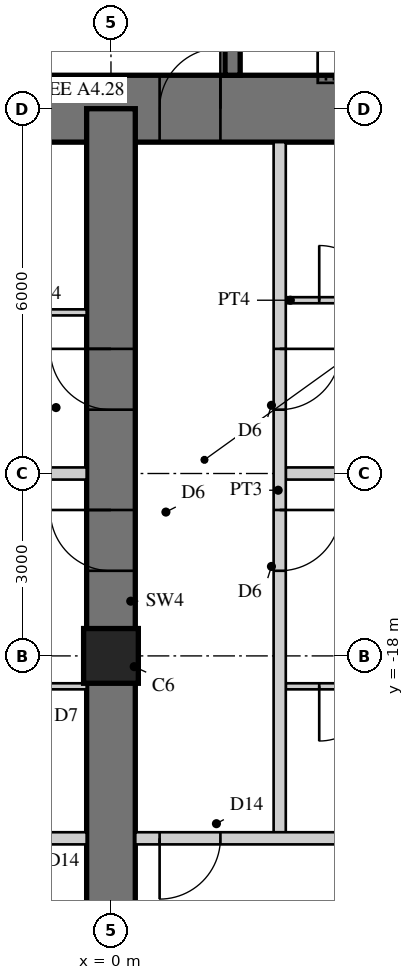
"""IFC4 building model, lengths in metres.
Left out: names, types, materials, properties, quantities, classifications, styles, units other than length and angle.
Written with IfcOpenShell. Run it as: python <this file> out.ifc"""

import sys

from ifc_helpers import new_model, si_unit, direction, frame, frame_2d, origin, origin_2d, place, context, subcontext, project, spatial, rectangle, extrude, element, fill, save


model = new_model("IFC4")
c1 = context("Model", 3, precision=1e-05, world=origin(), true_north=direction((0.0, 1.0)))
c2 = subcontext(c1, "Body", "Model", "MODEL_VIEW")
j1 = project(units=[si_unit("LENGTHUNIT", "METRE"), si_unit("PLANEANGLEUNIT", "RADIAN")], contexts=[c1])
p1 = place(None, origin())
s1 = spatial("IfcSite", under=j1, at=p1, CompositionType="ELEMENT")
p2 = place(p1, origin())
s2 = spatial("IfcBuilding", under=s1, at=p2, CompositionType="ELEMENT")
p3 = place(p2, frame((0.0, 0.0, 172.9)))
s3 = spatial("IfcBuildingStorey", under=s2, at=p3, CompositionType="ELEMENT", Elevation=172.9)
p4 = place(p3, frame((-9.0, -9.0, 0.0), z_axis=(0.0, 0.0, 1.0), x_axis=(1.0, 0.0, 0.0)))
e1 = element("IfcWall", 1, at=p4, inside=s3, PredefinedType="SHEAR", context=c2, shape_type="SweptSolid", body=[
    extrude(rectangle(XDim=18.0, YDim=1.1, at=frame_2d((9.0, 0.0))), origin(), (0.0, 0.0, 1.0), 3.4),
])
p5 = place(p4, frame((9.8, 0.0, 0.0)))
e2 = element("IfcOpeningElement", 2, at=p5, cuts=e1, PredefinedType="OPENING", context=c2, shape_type="SweptSolid", body=[
    extrude(rectangle(XDim=1.0, YDim=2.4, at=frame_2d((0.5, 1.2))), frame((0.0, 0.56, 0.0), z_axis=(0.0, -1.0, 0.0), x_axis=(1.0, 0.0, 0.0)), (0.0, 0.0, 1.0), 1.12),
])
p6 = place(p3, frame((2.0, -1.675, 0.0), z_axis=(0.0, 0.0, 1.0), x_axis=(0.0, -1.0, 0.0)))
e3 = element("IfcWall", 3, at=p6, inside=s3, PredefinedType="SHEAR", context=c2, shape_type="SweptSolid", body=[
    extrude(rectangle(XDim=6.775, YDim=0.25, at=frame_2d((3.387, 0.0))), origin(), (0.0, 0.0, 1.0), 3.4),
])
p7 = place(p6, frame((0.725, 0.0, 0.0)))
e4 = element("IfcOpeningElement", 4, at=p7, cuts=e3, PredefinedType="OPENING", context=c2, shape_type="SweptSolid", body=[
    extrude(rectangle(XDim=1.0, YDim=2.1, at=frame_2d((0.5, 1.05))), frame((0.0, 0.135, 0.0), z_axis=(0.0, -1.0, 0.0), x_axis=(1.0, 0.0, 0.0)), (0.0, 0.0, 1.0), 0.27),
])
p8 = place(p3, frame((0.0, -9.0, 0.0), z_axis=(0.0, 0.0, 1.0), x_axis=(0.0, -1.0, 0.0)))
e5 = element("IfcWall", 5, at=p8, inside=s3, PredefinedType="SHEAR", context=c2, shape_type="SweptSolid", body=[
    extrude(rectangle(XDim=18.0, YDim=0.8, at=frame_2d((9.0, 0.0))), origin(), (0.0, 0.0, 1.0), 3.4),
])
p9 = place(p8, frame((3.95, 0.0, 0.0)))
e6 = element("IfcOpeningElement", 6, at=p9, cuts=e5, PredefinedType="OPENING", context=c2, shape_type="SweptSolid", body=[
    extrude(rectangle(XDim=1.0, YDim=2.15, at=frame_2d((0.5, 1.075))), frame((0.0, 0.41, 0.0), z_axis=(0.0, -1.0, 0.0), x_axis=(1.0, 0.0, 0.0)), (0.0, 0.0, 1.0), 0.82),
])
p10 = place(p8, frame((6.6, 0.0, 0.0)))
e7 = element("IfcOpeningElement", 7, at=p10, cuts=e5, PredefinedType="OPENING", context=c2, shape_type="SweptSolid", body=[
    extrude(rectangle(XDim=1.0, YDim=2.15, at=frame_2d((0.5, 1.075))), frame((0.0, 0.41, 0.0), z_axis=(0.0, -1.0, 0.0), x_axis=(1.0, 0.0, 0.0)), (0.0, 0.0, 1.0), 0.82),
])
p11 = place(p8, frame((13.25, 0.0, 0.0)))
e8 = element("IfcOpeningElement", 8, at=p11, cuts=e5, PredefinedType="OPENING", context=c2, shape_type="SweptSolid", body=[
    extrude(rectangle(XDim=1.0, YDim=2.2, at=frame_2d((0.5, 1.1))), frame((0.0, 0.41, 0.0), z_axis=(0.0, -1.0, 0.0), x_axis=(1.0, 0.0, 0.0)), (0.0, 0.0, 1.0), 0.82),
])
p12 = place(p3, frame((0.0, -18.0, 0.0), z_axis=(0.0, 0.0, 1.0), x_axis=(1.0, 0.0, 0.0)))
e9 = element("IfcColumn", 9, at=p12, inside=s3, PredefinedType="COLUMN", context=c2, shape_type="SweptSolid", body=[
    extrude(rectangle(XDim=0.9, YDim=0.9, at=origin_2d()), origin(), (0.0, 0.0, 1.0), 3.4),
])
p13 = place(p3, frame((2.875, -12.15, 0.0), z_axis=(0.0, 0.0, 1.0), x_axis=(1.0, 0.0, 0.0)))
e10 = element("IfcWall", 10, at=p13, inside=s3, PredefinedType="PARTITIONING", context=c2, shape_type="SweptSolid", body=[
    extrude(rectangle(XDim=2.2, YDim=0.1, at=frame_2d((1.1, 0.0))), origin(), (0.0, 0.0, 1.0), 3.22),
])
p14 = place(p13, frame((0.55, 0.0, 0.0)))
e11 = element("IfcOpeningElement", 11, at=p14, cuts=e10, PredefinedType="OPENING", context=c2, shape_type="SweptSolid", body=[
    extrude(rectangle(XDim=0.9, YDim=2.1, at=frame_2d((0.45, 1.05))), frame((0.0, 0.06, 0.0), z_axis=(0.0, -1.0, 0.0), x_axis=(1.0, 0.0, 0.0)), (0.0, 0.0, 1.0), 0.12),
])
p15 = place(p3, frame((-3.0, -12.35, 0.0), z_axis=(0.0, 0.0, 1.0), x_axis=(1.0, 0.0, 0.0)))
e12 = element("IfcWall", 12, at=p15, inside=s3, PredefinedType="PARTITIONING", context=c2, shape_type="SweptSolid", body=[
    extrude(rectangle(XDim=2.6, YDim=0.1, at=frame_2d((1.3, 0.0))), origin(), (0.0, 0.0, 1.0), 3.22),
])
p16 = place(p15, frame((0.55, 0.0, 0.0)))
e13 = element("IfcOpeningElement", 13, at=p16, cuts=e12, PredefinedType="OPENING", context=c2, shape_type="SweptSolid", body=[
    extrude(rectangle(XDim=0.9, YDim=2.1, at=frame_2d((0.45, 1.05))), frame((0.0, 0.06, 0.0), z_axis=(0.0, -1.0, 0.0), x_axis=(1.0, 0.0, 0.0)), (0.0, 0.0, 1.0), 0.12),
])
p17 = place(p3, frame((2.875, -15.0, 0.0), z_axis=(0.0, 0.0, 1.0), x_axis=(1.0, 0.0, 0.0)))
e14 = element("IfcWall", 14, at=p17, inside=s3, PredefinedType="SOLIDWALL", context=c2, shape_type="SweptSolid", body=[
    extrude(rectangle(XDim=5.675, YDim=0.2, at=frame_2d((2.837, 0.0))), origin(), (0.0, 0.0, 1.0), 2.47),
])
p18 = place(p3, frame((-8.55, -15.0, 0.0), z_axis=(0.0, 0.0, 1.0), x_axis=(1.0, 0.0, 0.0)))
e15 = element("IfcWall", 15, at=p18, inside=s3, PredefinedType="SOLIDWALL", context=c2, shape_type="SweptSolid", body=[
    extrude(rectangle(XDim=8.15, YDim=0.2, at=frame_2d((4.075, 0.0))), origin(), (0.0, 0.0, 1.0), 2.47),
])
p19 = place(p3, frame((2.875, -18.5, 0.0), z_axis=(0.0, 0.0, 1.0), x_axis=(1.0, 0.0, 0.0)))
e16 = element("IfcWall", 16, at=p19, inside=s3, PredefinedType="PARTITIONING", context=c2, shape_type="SweptSolid", body=[
    extrude(rectangle(XDim=2.2, YDim=0.1, at=frame_2d((1.1, 0.0))), origin(), (0.0, 0.0, 1.0), 3.22),
])
p20 = place(p19, frame((0.55, 0.0, 0.0)))
e17 = element("IfcOpeningElement", 17, at=p20, cuts=e16, PredefinedType="OPENING", context=c2, shape_type="SweptSolid", body=[
    extrude(rectangle(XDim=0.9, YDim=2.1, at=frame_2d((0.45, 1.05))), frame((0.0, 0.06, 0.0), z_axis=(0.0, -1.0, 0.0), x_axis=(1.0, 0.0, 0.0)), (0.0, 0.0, 1.0), 0.12),
])
p21 = place(p3, frame((-2.6, -18.5, 0.0), z_axis=(0.0, 0.0, 1.0), x_axis=(1.0, 0.0, 0.0)))
e18 = element("IfcWall", 18, at=p21, inside=s3, PredefinedType="PARTITIONING", context=c2, shape_type="SweptSolid", body=[
    extrude(rectangle(XDim=2.2, YDim=0.1, at=frame_2d((1.1, 0.0))), origin(), (0.0, 0.0, 1.0), 3.22),
])
p22 = place(p21, frame((0.55, 0.0, 0.0)))
e19 = element("IfcOpeningElement", 19, at=p22, cuts=e18, PredefinedType="OPENING", context=c2, shape_type="SweptSolid", body=[
    extrude(rectangle(XDim=0.9, YDim=2.1, at=frame_2d((0.45, 1.05))), frame((0.0, 0.06, 0.0), z_axis=(0.0, -1.0, 0.0), x_axis=(1.0, 0.0, 0.0)), (0.0, 0.0, 1.0), 0.12),
])
p23 = place(p3, frame((2.775, -9.55, 0.0), z_axis=(0.0, 0.0, 1.0), x_axis=(0.0, -1.0, 0.0)))
e20 = element("IfcWall", 20, at=p23, inside=s3, PredefinedType="SOLIDWALL", context=c2, shape_type="SweptSolid", body=[
    extrude(rectangle(XDim=11.45, YDim=0.2, at=frame_2d((5.725, 0.0))), origin(), (0.0, 0.0, 1.0), 3.22),
])
p24 = place(p23, frame((3.4, 0.0, 0.0)))
e21 = element("IfcOpeningElement", 21, at=p24, cuts=e20, PredefinedType="OPENING", context=c2, shape_type="SweptSolid", body=[
    extrude(rectangle(XDim=1.0, YDim=2.15, at=frame_2d((0.5, 1.075))), frame((0.0, 0.11, 0.0), z_axis=(0.0, -1.0, 0.0), x_axis=(1.0, 0.0, 0.0)), (0.0, 0.0, 1.0), 0.22),
])
p25 = place(p23, frame((6.05, 0.0, 0.0)))
e22 = element("IfcOpeningElement", 22, at=p25, cuts=e20, PredefinedType="OPENING", context=c2, shape_type="SweptSolid", body=[
    extrude(rectangle(XDim=1.0, YDim=2.15, at=frame_2d((0.5, 1.075))), frame((0.0, 0.11, 0.0), z_axis=(0.0, -1.0, 0.0), x_axis=(1.0, 0.0, 0.0)), (0.0, 0.0, 1.0), 0.22),
])
p26 = place(p3, frame((-9.0, -21.0, 0.0), z_axis=(0.0, 0.0, 1.0), x_axis=(1.0, 0.0, 0.0)))
e23 = element("IfcWall", 23, at=p26, inside=s3, PredefinedType="SOLIDWALL", context=c2, shape_type="SweptSolid", body=[
    extrude(rectangle(XDim=8.6, YDim=0.2, at=frame_2d((4.3, 0.0))), origin(), (0.0, 0.0, 1.0), 2.62),
])
p27 = place(p3, frame((0.4, -21.0, 0.0), z_axis=(0.0, 0.0, 1.0), x_axis=(1.0, 0.0, 0.0)))
e24 = element("IfcWall", 24, at=p27, inside=s3, PredefinedType="SOLIDWALL", context=c2, shape_type="SweptSolid", body=[
    extrude(rectangle(XDim=8.6, YDim=0.2, at=frame_2d((4.3, 0.0))), origin(), (0.0, 0.0, 1.0), 2.62),
])
p28 = place(p27, frame((0.4, 0.0, 0.0)))
e25 = element("IfcOpeningElement", 25, at=p28, cuts=e24, PredefinedType="OPENING", context=c2, shape_type="SweptSolid", body=[
    extrude(rectangle(XDim=1.0, YDim=2.2, at=frame_2d((0.5, 1.1))), frame((0.0, 0.11, 0.0), z_axis=(0.0, -1.0, 0.0), x_axis=(1.0, 0.0, 0.0)), (0.0, 0.0, 1.0), 0.22),
])
p29 = place(p14, origin())
e26 = element("IfcDoor", 26, at=p29, inside=s3, OperationType="SINGLE_SWING_LEFT", PredefinedType="DOOR", context=c2, shape_type="SweptSolid", body=[
    extrude(rectangle(XDim=0.9, YDim=2.1, at=frame_2d((0.45, 1.05))), frame((0.0, 0.025, 0.0), z_axis=(0.0, -1.0, 0.0), x_axis=(1.0, 0.0, 0.0)), (0.0, 0.0, 1.0), 0.05),
])
fill(e11, e26)
p30 = place(p20, frame((0.9, 0.0, 0.0), z_axis=(0.0, 0.0, 1.0), x_axis=(-1.0, 0.0, 0.0)))
e27 = element("IfcDoor", 27, at=p30, inside=s3, OperationType="SINGLE_SWING_RIGHT", PredefinedType="DOOR", context=c2, shape_type="SweptSolid", body=[
    extrude(rectangle(XDim=0.9, YDim=2.1, at=frame_2d((0.45, 1.05))), frame((0.0, 0.025, 0.0), z_axis=(0.0, -1.0, 0.0), x_axis=(1.0, 0.0, 0.0)), (0.0, 0.0, 1.0), 0.05),
])
fill(e17, e27)
p31 = place(p24, origin())
e28 = element("IfcDoor", 28, at=p31, inside=s3, OperationType="SINGLE_SWING_LEFT", PredefinedType="DOOR", context=c2, shape_type="SweptSolid", body=[
    extrude(rectangle(XDim=1.0, YDim=2.15, at=frame_2d((0.5, 1.075))), frame((0.0, 0.025, 0.0), z_axis=(0.0, -1.0, 0.0), x_axis=(1.0, 0.0, 0.0)), (0.0, 0.0, 1.0), 0.05),
])
fill(e21, e28)
p32 = place(p25, origin())
e29 = element("IfcDoor", 29, at=p32, inside=s3, OperationType="SINGLE_SWING_LEFT", PredefinedType="DOOR", context=c2, shape_type="SweptSolid", body=[
    extrude(rectangle(XDim=1.0, YDim=2.15, at=frame_2d((0.5, 1.075))), frame((0.0, 0.025, 0.0), z_axis=(0.0, -1.0, 0.0), x_axis=(1.0, 0.0, 0.0)), (0.0, 0.0, 1.0), 0.05),
])
fill(e22, e29)
p33 = place(p28, frame((1.0, 0.0, 0.0), z_axis=(0.0, 0.0, 1.0), x_axis=(-1.0, 0.0, 0.0)))
e30 = element("IfcDoor", 30, at=p33, inside=s3, OperationType="SINGLE_SWING_RIGHT", PredefinedType="DOOR", context=c2, shape_type="SweptSolid", body=[
    extrude(rectangle(XDim=1.0, YDim=2.2, at=frame_2d((0.5, 1.1))), frame((0.0, 0.025, 0.0), z_axis=(0.0, -1.0, 0.0), x_axis=(1.0, 0.0, 0.0)), (0.0, 0.0, 1.0), 0.05),
])
fill(e25, e30)
p34 = place(p9, frame((1.0, 0.0, 0.0), z_axis=(0.0, 0.0, 1.0), x_axis=(-1.0, 0.0, 0.0)))
e31 = element("IfcDoor", 31, at=p34, inside=s3, OperationType="SINGLE_SWING_RIGHT", PredefinedType="DOOR", context=c2, shape_type="SweptSolid", body=[
    extrude(rectangle(XDim=1.0, YDim=2.15, at=frame_2d((0.5, 1.075))), frame((0.0, 0.025, 0.0), z_axis=(0.0, -1.0, 0.0), x_axis=(1.0, 0.0, 0.0)), (0.0, 0.0, 1.0), 0.05),
])
fill(e6, e31)
p35 = place(p10, frame((1.0, 0.0, 0.0), z_axis=(0.0, 0.0, 1.0), x_axis=(-1.0, 0.0, 0.0)))
e32 = element("IfcDoor", 32, at=p35, inside=s3, OperationType="SINGLE_SWING_RIGHT", PredefinedType="DOOR", context=c2, shape_type="SweptSolid", body=[
    extrude(rectangle(XDim=1.0, YDim=2.15, at=frame_2d((0.5, 1.075))), frame((0.0, 0.025, 0.0), z_axis=(0.0, -1.0, 0.0), x_axis=(1.0, 0.0, 0.0)), (0.0, 0.0, 1.0), 0.05),
])
fill(e7, e32)
p36 = place(p5, origin())
e33 = element("IfcDoor", 33, at=p36, inside=s3, OperationType="SINGLE_SWING_RIGHT", PredefinedType="DOOR", context=c2, shape_type="SweptSolid", body=[
    extrude(rectangle(XDim=1.0, YDim=2.4, at=frame_2d((0.5, 1.2))), frame((0.0, 0.055, 0.0), z_axis=(0.0, -1.0, 0.0), x_axis=(1.0, 0.0, 0.0)), (0.0, 0.0, 1.0), 0.05),
])
fill(e2, e33)
save(model, sys.argv[1])
